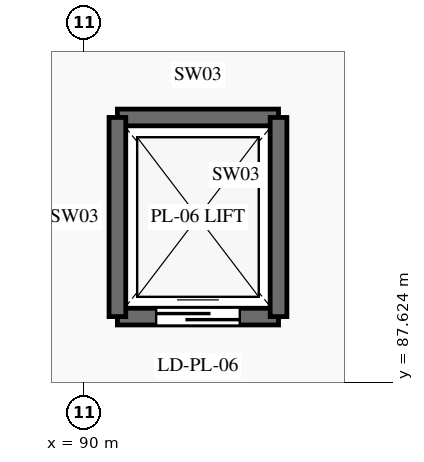
"""IFC4 building model, lengths in metres.
Left out: names, types, materials, properties, quantities, classifications, styles, units other than length and angle.
Written with IfcOpenShell. Run it as: python <this file> out.ifc"""

import sys

from ifc_helpers import new_model, si_unit, direction, frame, frame_2d, origin, place, context, subcontext, project, spatial, rectangle, extrude, element, fill, save


model = new_model("IFC4")
c1 = context("Model", 3, precision=1e-05, world=origin(), true_north=direction((0.0, 1.0)))
c2 = subcontext(c1, "Body", "Model", "MODEL_VIEW")
j1 = project(units=[si_unit("LENGTHUNIT", "METRE"), si_unit("PLANEANGLEUNIT", "RADIAN")], contexts=[c1])
p1 = place(None, origin())
s1 = spatial("IfcSite", under=j1, at=p1, CompositionType="ELEMENT")
p2 = place(p1, origin())
s2 = spatial("IfcBuilding", under=s1, at=p2, CompositionType="ELEMENT")
p3 = place(p2, frame((0.0, 0.0, 15.0)))
s3 = spatial("IfcBuildingStorey", under=s2, at=p3, CompositionType="ELEMENT", Elevation=15.0)
p4 = place(p3, frame((90.44, 88.49, 0.0), z_axis=(0.0, 0.0, 1.0), x_axis=(1.0, 0.0, 0.0)))
e1 = element("IfcWall", 1, at=p4, inside=s3, PredefinedType="SHEAR", context=c2, shape_type="SweptSolid", body=[
    extrude(rectangle(XDim=2.12, YDim=0.22, at=frame_2d((1.06, 0.0))), origin(), (0.0, 0.0, 1.0), 3.9),
])
p5 = place(p4, frame((0.51, 0.0, 0.0)))
e2 = element("IfcOpeningElement", 2, at=p5, cuts=e1, PredefinedType="OPENING", context=c2, shape_type="SweptSolid", body=[
    extrude(rectangle(XDim=1.1, YDim=2.15, at=frame_2d((0.55, 1.075))), frame((0.0, 0.125, 0.0), z_axis=(0.0, -1.0, 0.0), x_axis=(1.0, 0.0, 0.0)), (0.0, 0.0, 1.0), 0.25),
])
p6 = place(p3, frame((90.44, 91.11, 0.0), z_axis=(0.0, 0.0, 1.0), x_axis=(1.0, 0.0, 0.0)))
e3 = element("IfcWall", 3, at=p6, inside=s3, PredefinedType="SHEAR", context=c2, shape_type="SweptSolid", body=[
    extrude(rectangle(XDim=2.12, YDim=0.22, at=frame_2d((1.06, 0.0))), origin(), (0.0, 0.0, 1.0), 3.9),
])
for number, where, z_axis, x_axis in (
    (4, (90.44, 88.49, 0.0), (0.0, 0.0, 1.0), (0.0, 1.0, 0.0)),
    (5, (92.56, 88.49, 0.0), (0.0, 0.0, 1.0), (0.0, 1.0, 0.0)),
):
    element("IfcWall", number, at=place(p3, frame(where, z_axis=z_axis, x_axis=x_axis)), inside=s3, PredefinedType="SHEAR", context=c2, shape_type="SweptSolid", body=[
        extrude(rectangle(XDim=2.62, YDim=0.22, at=frame_2d((1.31, 0.0))), origin(), (0.0, 0.0, 1.0), 3.9),
    ])
p7 = place(p5, origin())
e6 = element("IfcDoor", 6, at=p7, inside=s3, OperationType="SLIDING_TO_RIGHT", PredefinedType="DOOR", context=c2, shape_type="SweptSolid", body=[
    extrude(rectangle(XDim=1.1, YDim=2.15, at=frame_2d((0.55, 1.075))), frame((0.0, 0.025, 0.0), z_axis=(0.0, -1.0, 0.0), x_axis=(1.0, 0.0, 0.0)), (0.0, 0.0, 1.0), 0.05),
])
fill(e2, e6)
save(model, sys.argv[1])
